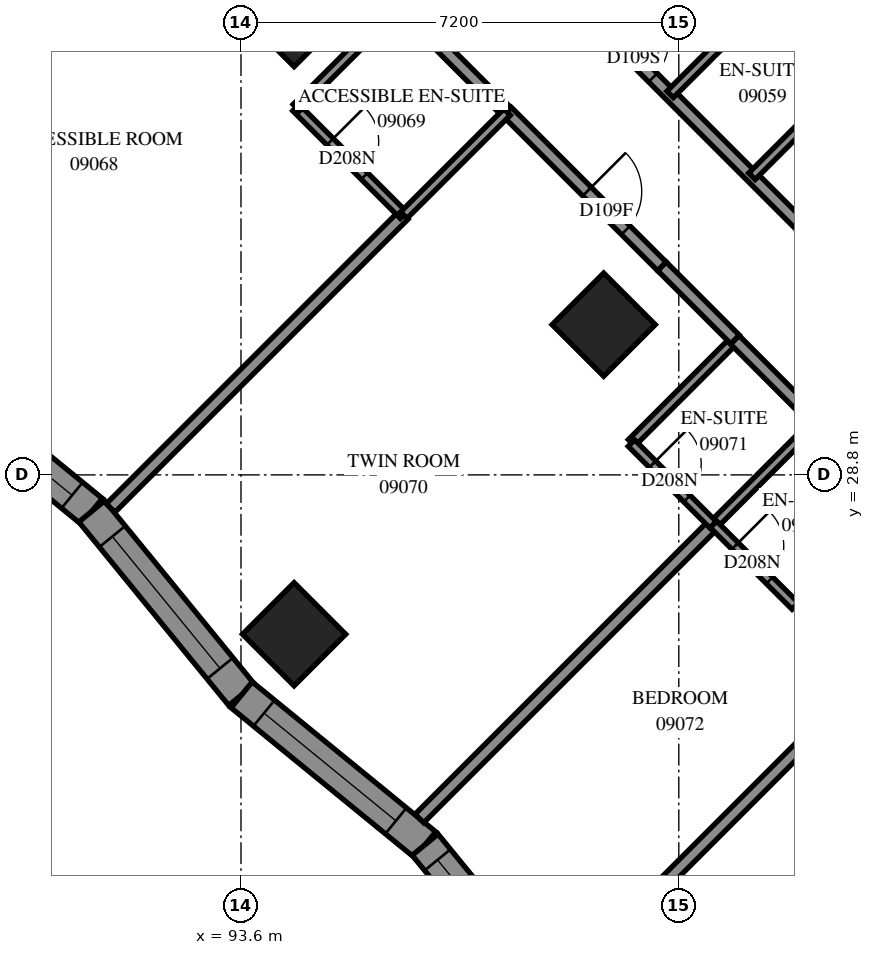
"""IFC4 building model, lengths in metres.
Left out: names, types, materials, properties, quantities, classifications, styles, units other than length and angle.
Written with IfcOpenShell. Run it as: python <this file> out.ifc"""

import sys

from ifc_helpers import new_model, si_unit, direction, frame, frame_2d, origin, origin_2d, place, context, subcontext, project, spatial, polyline, rectangle, outline, extrude, element, fill, save


model = new_model("IFC4")
c1 = context("Model", 3, precision=1e-05, world=origin(), true_north=direction((0.0, 1.0)))
c2 = subcontext(c1, "Body", "Model", "MODEL_VIEW")
j1 = project(units=[si_unit("LENGTHUNIT", "METRE"), si_unit("PLANEANGLEUNIT", "RADIAN")], contexts=[c1])
p1 = place(None, origin())
s1 = spatial("IfcSite", under=j1, at=p1, CompositionType="ELEMENT")
p2 = place(p1, origin())
s2 = spatial("IfcBuilding", under=s1, at=p2, CompositionType="ELEMENT")
p3 = place(p2, frame((0.0, 0.0, 37.2)))
s3 = spatial("IfcBuildingStorey", under=s2, at=p3, CompositionType="ELEMENT", Elevation=37.2)
for number, where, z_axis, x_axis in (
    (1, (94.474, 36.362, 0.0), (0.0, 0.0, 1.0), (0.707, -0.707, 0.0)),
    (2, (99.565, 31.271, 0.0), (0.0, 0.0, 1.0), (0.707, -0.707, 0.0)),
    (3, (94.474, 26.18, 0.0), (0.0, 0.0, 1.0), (0.707, -0.707, 0.0)),
):
    element("IfcColumn", number, at=place(p3, frame(where, z_axis=z_axis, x_axis=x_axis)), inside=s3, PredefinedType="COLUMN", context=c2, shape_type="SweptSolid", body=[
        extrude(rectangle(XDim=1.2, YDim=1.2, at=origin_2d()), origin(), (0.0, 0.0, 1.0), 3.1),
    ])
p4 = place(p3, frame((88.129, 30.665, 0.0), z_axis=(0.0, 0.0, 1.0), x_axis=(0.774508234, -0.6325638271, 0.0)))
e4 = element("IfcWall", 4, at=p4, inside=s3, PredefinedType="SOLIDWALL", context=c2, shape_type="SweptSolid", body=[
    extrude(outline(polyline([(-0.028, -0.275), (3.868, -0.275), (3.924, 0.275), (0.028, 0.275), (-0.028, -0.275)])), origin(), (0.0, 0.0, 1.0), 3.1),
])
p5 = place(p4, frame((0.678, 0.0, 0.5)))
e5 = element("IfcOpeningElement", 5, at=p5, cuts=e4, PredefinedType="OPENING", context=c2, shape_type="SweptSolid", body=[
    extrude(rectangle(XDim=2.8, YDim=2.45, at=frame_2d((1.4, 1.225))), frame((0.0, 0.285, 0.0), z_axis=(0.0, -1.0, 0.0), x_axis=(1.0, 0.0, 0.0)), (0.0, 0.0, 1.0), 0.57),
])
p6 = place(p3, frame((91.146, 28.2, 0.0), z_axis=(0.0, 0.0, 1.0), x_axis=(0.6325666489, -0.7745059294, 0.0)))
e6 = element("IfcWall", 6, at=p6, inside=s3, PredefinedType="SOLIDWALL", context=c2, shape_type="SweptSolid", body=[
    extrude(outline(polyline([(0.028, -0.275), (3.924, -0.275), (3.868, 0.275), (-0.028, 0.275), (0.028, -0.275)])), origin(), (0.0, 0.0, 1.0), 3.1),
])
p7 = place(p6, frame((0.534, 0.0, 0.5)))
e7 = element("IfcOpeningElement", 7, at=p7, cuts=e6, PredefinedType="OPENING", context=c2, shape_type="SweptSolid", body=[
    extrude(rectangle(XDim=2.8, YDim=2.45, at=frame_2d((1.4, 1.225))), frame((0.0, 0.285, 0.0), z_axis=(0.0, -1.0, 0.0), x_axis=(1.0, 0.0, 0.0)), (0.0, 0.0, 1.0), 0.57),
])
p8 = place(p3, frame((93.611, 25.183, 0.0), z_axis=(0.0, 0.0, 1.0), x_axis=(0.7744956586, -0.6325792241, 0.0)))
e8 = element("IfcWall", 8, at=p8, inside=s3, PredefinedType="SOLIDWALL", context=c2, shape_type="SweptSolid", body=[
    extrude(outline(polyline([(-0.028, -0.275), (3.868, -0.275), (3.924, 0.275), (0.028, 0.275), (-0.028, -0.275)])), origin(), (0.0, 0.0, 1.0), 3.1),
])
p9 = place(p8, frame((0.475, 0.0, 0.5)))
e9 = element("IfcOpeningElement", 9, at=p9, cuts=e8, PredefinedType="OPENING", context=c2, shape_type="SweptSolid", body=[
    extrude(rectangle(XDim=2.8, YDim=2.45, at=frame_2d((1.4, 1.225))), frame((0.0, 0.285, 0.0), z_axis=(0.0, -1.0, 0.0), x_axis=(1.0, 0.0, 0.0)), (0.0, 0.0, 1.0), 0.57),
])
p10 = place(p3, frame((96.628, 22.718, 0.0), z_axis=(0.0, 0.0, 1.0), x_axis=(0.6325792241, -0.7744956586, 0.0)))
e10 = element("IfcWall", 10, at=p10, inside=s3, PredefinedType="SOLIDWALL", context=c2, shape_type="SweptSolid", body=[
    extrude(outline(polyline([(0.028, -0.275), (3.924, -0.275), (3.868, 0.275), (-0.028, 0.275), (0.028, -0.275)])), origin(), (0.0, 0.0, 1.0), 3.1),
])
p11 = place(p10, frame((0.323, 0.0, 0.5)))
e11 = element("IfcOpeningElement", 11, at=p11, cuts=e10, PredefinedType="OPENING", context=c2, shape_type="SweptSolid", body=[
    extrude(rectangle(XDim=2.8, YDim=2.45, at=frame_2d((1.4, 1.225))), frame((0.0, 0.285, 0.0), z_axis=(0.0, -1.0, 0.0), x_axis=(1.0, 0.0, 0.0)), (0.0, 0.0, 1.0), 0.57),
])
p12 = place(p3, frame((86.33, 33.302, 0.0), z_axis=(0.0, 0.0, 1.0), x_axis=(0.7069989149, 0.707214631, 0.0)))
e12 = element("IfcWall", 12, at=p12, inside=s3, PredefinedType="PARTITIONING", context=c2, shape_type="SweptSolid", body=[
    extrude(rectangle(XDim=9.271, YDim=0.2, at=frame_2d((4.636, 0.0))), origin(), (0.0, 0.0, 1.0), 3.1),
])
p13 = place(p3, frame((92.243, 40.495, 0.0), z_axis=(0.0, 0.0, 1.0), x_axis=(0.7071067812, -0.7071067812, 0.0)))
e13 = element("IfcWall", 13, at=p13, inside=s3, PredefinedType="PARTITIONING", context=c2, shape_type="SweptSolid", body=[
    extrude(rectangle(XDim=8.101, YDim=0.2, at=frame_2d((4.05, 0.0))), origin(), (0.0, 0.0, 1.0), 3.1),
])
p14 = place(p13, frame((2.75, 0.0, 0.0)))
e14 = element("IfcOpeningElement", 14, at=p14, cuts=e13, PredefinedType="OPENING", context=c2, shape_type="SweptSolid", body=[
    extrude(rectangle(XDim=0.9, YDim=2.1, at=frame_2d((0.45, 1.05))), frame((0.0, 0.11, 0.0), z_axis=(0.0, -1.0, 0.0), x_axis=(1.0, 0.0, 0.0)), (0.0, 0.0, 1.0), 0.22),
])
p15 = place(p3, frame((86.836, 35.372, 0.0), z_axis=(0.0, 0.0, 1.0), x_axis=(0.7071067812, 0.7071067812, 0.0)))
e15 = element("IfcWall", 15, at=p15, inside=s3, PredefinedType="PARTITIONING", context=c2, shape_type="SweptSolid", body=[
    extrude(rectangle(XDim=7.45, YDim=0.2, at=frame_2d((3.725, 0.0))), origin(), (0.0, 0.0, 1.0), 3.1),
])
p16 = place(p15, frame((6.192, 0.0, 0.0)))
e16 = element("IfcOpeningElement", 16, at=p16, cuts=e15, PredefinedType="OPENING", context=c2, shape_type="SweptSolid", body=[
    extrude(rectangle(XDim=1.0, YDim=2.1, at=frame_2d((0.5, 1.05))), frame((0.0, 0.11, 0.0), z_axis=(0.0, -1.0, 0.0), x_axis=(1.0, 0.0, 0.0)), (0.0, 0.0, 1.0), 0.22),
])
p17 = place(p3, frame((99.455, 36.253, 0.0), z_axis=(0.0, 0.0, 1.0), x_axis=(0.7071067812, -0.7071067812, 0.0)))
e17 = element("IfcWall", 17, at=p17, inside=s3, PredefinedType="PARTITIONING", context=c2, shape_type="SweptSolid", body=[
    extrude(rectangle(XDim=7.201, YDim=0.2, at=frame_2d((3.601, 0.0))), origin(), (0.0, 0.0, 1.0), 3.1),
])
p18 = place(p17, frame((0.401, 0.0, 0.0)))
e18 = element("IfcOpeningElement", 18, at=p18, cuts=e17, PredefinedType="OPENING", context=c2, shape_type="SweptSolid", body=[
    extrude(rectangle(XDim=0.9, YDim=2.1, at=frame_2d((0.45, 1.05))), frame((0.0, 0.11, 0.0), z_axis=(0.0, -1.0, 0.0), x_axis=(1.0, 0.0, 0.0)), (0.0, 0.0, 1.0), 0.22),
])
p19 = place(p3, frame((96.534, 23.151, 0.0), z_axis=(0.0, 0.0, 1.0), x_axis=(0.7071067812, 0.7071067812, 0.0)))
e19 = element("IfcWall", 19, at=p19, inside=s3, PredefinedType="PARTITIONING", context=c2, shape_type="SweptSolid", body=[
    extrude(rectangle(XDim=6.835, YDim=0.2, at=frame_2d((3.417, 0.0))), origin(), (0.0, 0.0, 1.0), 3.1),
])
p20 = place(p3, frame((91.457, 28.255, 0.0), z_axis=(0.0, 0.0, 1.0), x_axis=(0.7071067812, 0.7071067812, 0.0)))
e20 = element("IfcWall", 20, at=p20, inside=s3, PredefinedType="PARTITIONING", context=c2, shape_type="SweptSolid", body=[
    extrude(rectangle(XDim=6.815, YDim=0.2, at=frame_2d((3.408, 0.0))), origin(), (0.0, 0.0, 1.0), 3.1),
])
p21 = place(p3, frame((100.163, 21.689, 0.0), z_axis=(0.0, 0.0, 1.0), x_axis=(0.7071067812, 0.7071067812, 0.0)))
e21 = element("IfcWall", 21, at=p21, inside=s3, PredefinedType="PARTITIONING", context=c2, shape_type="SweptSolid", body=[
    extrude(rectangle(XDim=5.504, YDim=0.2, at=frame_2d((2.752, 0.0))), origin(), (0.0, 0.0, 1.0), 3.1),
])
p22 = place(p3, frame((97.976, 34.772, 0.0), z_axis=(0.0, 0.0, 1.0), x_axis=(0.7073845681, -0.7068288851, 0.0)))
e22 = element("IfcWall", 22, at=p22, inside=s3, PredefinedType="PARTITIONING", context=c2, shape_type="SweptSolid", body=[
    extrude(rectangle(XDim=3.599, YDim=0.2, at=frame_2d((1.8, 0.0))), origin(), (0.0, 0.0, 1.0), 3.1),
])
p23 = place(p22, frame((1.858, 0.0, 0.0)))
e23 = element("IfcOpeningElement", 23, at=p23, cuts=e22, PredefinedType="OPENING", context=c2, shape_type="SweptSolid", body=[
    extrude(rectangle(XDim=0.9, YDim=2.1, at=frame_2d((0.45, 1.05))), frame((0.0, 0.11, 0.0), z_axis=(0.0, -1.0, 0.0), x_axis=(1.0, 0.0, 0.0)), (0.0, 0.0, 1.0), 0.22),
])
p24 = place(p3, frame((94.505, 34.839, 0.0), z_axis=(0.0, 0.0, 1.0), x_axis=(0.7071067812, -0.7071067812, 0.0)))
e24 = element("IfcWall", 24, at=p24, inside=s3, PredefinedType="PARTITIONING", context=c2, shape_type="SweptSolid", body=[
    extrude(rectangle(XDim=2.5, YDim=0.15, at=frame_2d((1.25, 0.0))), origin(), (0.0, 0.0, 1.0), 3.1),
])
p25 = place(p24, frame((0.792, 0.0, 0.0)))
e25 = element("IfcOpeningElement", 25, at=p25, cuts=e24, PredefinedType="OPENING", context=c2, shape_type="SweptSolid", body=[
    extrude(rectangle(XDim=0.8, YDim=2.1, at=frame_2d((0.4, 1.05))), frame((0.0, 0.085, 0.0), z_axis=(0.0, -1.0, 0.0), x_axis=(1.0, 0.0, 0.0)), (0.0, 0.0, 1.0), 0.17),
])
for number, where, z_axis, x_axis in (
    (26, (102.003, 33.711, 0.0), (0.0, 0.0, 1.0), (0.707, 0.707, 0.0)),
    (27, (100.023, 29.327, 0.0), (0.0, 0.0, 1.0), (0.707, 0.707, 0.0)),
):
    element("IfcWall", number, at=place(p3, frame(where, z_axis=z_axis, x_axis=x_axis)), inside=s3, PredefinedType="PARTITIONING", context=c2, shape_type="SweptSolid", body=[
        extrude(rectangle(XDim=2.401, YDim=0.15, at=frame_2d((1.201, 0.0))), origin(), (0.0, 0.0, 1.0), 3.1),
    ])
for number, where, z_axis, x_axis in (
    (28, (96.278, 33.072, 0.0), (0.0, 0.0, 1.0), (0.708, 0.707, 0.0)),
    (29, (94.511, 34.839, 0.0), (0.0, 0.0, 1.0), (0.708, 0.707, 0.0)),
    (30, (100.657, 35.057, 0.0), (0.0, 0.0, 1.0), (0.708, 0.707, 0.0)),
    (31, (101.371, 27.979, 0.0), (0.0, 0.0, 1.0), (0.707, 0.708, 0.0)),
):
    element("IfcWall", number, at=place(p3, frame(where, z_axis=z_axis, x_axis=x_axis)), inside=s3, PredefinedType="PARTITIONING", context=c2, shape_type="SweptSolid", body=[
        extrude(rectangle(XDim=2.4, YDim=0.15, at=frame_2d((1.2, 0.0))), origin(), (0.0, 0.0, 1.0), 3.1),
    ])
p26 = place(p3, frame((102.711, 26.641, 0.0), z_axis=(0.0, 0.0, 1.0), x_axis=(0.7071067812, 0.7071067812, 0.0)))
e32 = element("IfcWall", 32, at=p26, inside=s3, PredefinedType="PARTITIONING", context=c2, shape_type="SweptSolid", body=[
    extrude(rectangle(XDim=2.398, YDim=0.15, at=frame_2d((1.199, 0.0))), origin(), (0.0, 0.0, 1.0), 3.1),
])
p27 = place(p3, frame((100.021, 29.323, 0.0), z_axis=(0.0, 0.0, 1.0), x_axis=(0.7071067812, -0.7071067812, 0.0)))
e33 = element("IfcWall", 33, at=p27, inside=s3, PredefinedType="PARTITIONING", context=c2, shape_type="SweptSolid", body=[
    extrude(rectangle(XDim=1.901, YDim=0.15, at=frame_2d((0.95, 0.0))), origin(), (0.0, 0.0, 1.0), 3.1),
])
p28 = place(p27, frame((0.491, 0.0, 0.0)))
e34 = element("IfcOpeningElement", 34, at=p28, cuts=e33, PredefinedType="OPENING", context=c2, shape_type="SweptSolid", body=[
    extrude(rectangle(XDim=0.8, YDim=2.1, at=frame_2d((0.4, 1.05))), frame((0.0, 0.085, 0.0), z_axis=(0.0, -1.0, 0.0), x_axis=(1.0, 0.0, 0.0)), (0.0, 0.0, 1.0), 0.17),
])
p29 = place(p3, frame((101.371, 27.985, 0.0), z_axis=(0.0, 0.0, 1.0), x_axis=(0.7076330979, -0.7065800724, 0.0)))
e35 = element("IfcWall", 35, at=p29, inside=s3, PredefinedType="PARTITIONING", context=c2, shape_type="SweptSolid", body=[
    extrude(rectangle(XDim=1.899, YDim=0.15, at=frame_2d((0.95, 0.0))), origin(), (0.0, 0.0, 1.0), 3.1),
])
p30 = place(p29, frame((0.501, 0.0, 0.0)))
e36 = element("IfcOpeningElement", 36, at=p30, cuts=e35, PredefinedType="OPENING", context=c2, shape_type="SweptSolid", body=[
    extrude(rectangle(XDim=0.8, YDim=2.1, at=frame_2d((0.4, 1.05))), frame((0.0, 0.085, 0.0), z_axis=(0.0, -1.0, 0.0), x_axis=(1.0, 0.0, 0.0)), (0.0, 0.0, 1.0), 0.17),
])
p31 = place(p3, frame((101.72, 31.022, 0.0), z_axis=(0.0, 0.0, 1.0), x_axis=(0.7065800724, -0.7076330979, 0.0)))
e37 = element("IfcWall", 37, at=p31, inside=s3, PredefinedType="PARTITIONING", context=c2, shape_type="SweptSolid", body=[
    extrude(rectangle(XDim=1.899, YDim=0.2, at=frame_2d((0.95, 0.0))), origin(), (0.0, 0.0, 1.0), 3.1),
])
p32 = place(p3, frame((102.358, 36.75, 0.0), z_axis=(0.0, 0.0, 1.0), x_axis=(0.7076330979, -0.7065800724, 0.0)))
e38 = element("IfcWall", 38, at=p32, inside=s3, PredefinedType="PARTITIONING", context=c2, shape_type="SweptSolid", body=[
    extrude(rectangle(XDim=1.899, YDim=0.15, at=frame_2d((0.95, 0.0))), origin(), (0.0, 0.0, 1.0), 3.1),
])
p33 = place(p32, frame((0.296, 0.0, 0.0)))
e39 = element("IfcOpeningElement", 39, at=p33, cuts=e38, PredefinedType="OPENING", context=c2, shape_type="SweptSolid", body=[
    extrude(rectangle(XDim=0.8, YDim=2.1, at=frame_2d((0.4, 1.05))), frame((0.0, 0.085, 0.0), z_axis=(0.0, -1.0, 0.0), x_axis=(1.0, 0.0, 0.0)), (0.0, 0.0, 1.0), 0.17),
])
p34 = place(p3, frame((100.523, 32.229, 0.0), z_axis=(0.0, 0.0, 1.0), x_axis=(0.7071067812, -0.7071067812, 0.0)))
e40 = element("IfcWall", 40, at=p34, inside=s3, PredefinedType="PARTITIONING", context=c2, shape_type="SweptSolid", body=[
    extrude(rectangle(XDim=1.7, YDim=0.2, at=frame_2d((0.85, 0.0))), origin(), (0.0, 0.0, 1.0), 3.1),
])
p35 = place(p5, origin())
e41 = element("IfcWindow", 41, at=p35, inside=s3, PartitioningType="SINGLE_PANEL", PredefinedType="WINDOW", context=c2, shape_type="SweptSolid", body=[
    extrude(rectangle(XDim=2.8, YDim=2.45, at=frame_2d((1.4, 1.225))), frame((0.0, 0.155, 0.0), z_axis=(0.0, -1.0, 0.0), x_axis=(1.0, 0.0, 0.0)), (0.0, 0.0, 1.0), 0.06),
])
fill(e5, e41)
p36 = place(p7, origin())
e42 = element("IfcWindow", 42, at=p36, inside=s3, PartitioningType="SINGLE_PANEL", PredefinedType="WINDOW", context=c2, shape_type="SweptSolid", body=[
    extrude(rectangle(XDim=2.8, YDim=2.45, at=frame_2d((1.4, 1.225))), frame((0.0, 0.155, 0.0), z_axis=(0.0, -1.0, 0.0), x_axis=(1.0, 0.0, 0.0)), (0.0, 0.0, 1.0), 0.06),
])
fill(e7, e42)
p37 = place(p9, origin())
e43 = element("IfcWindow", 43, at=p37, inside=s3, PartitioningType="SINGLE_PANEL", PredefinedType="WINDOW", context=c2, shape_type="SweptSolid", body=[
    extrude(rectangle(XDim=2.8, YDim=2.45, at=frame_2d((1.4, 1.225))), frame((0.0, 0.155, 0.0), z_axis=(0.0, -1.0, 0.0), x_axis=(1.0, 0.0, 0.0)), (0.0, 0.0, 1.0), 0.06),
])
fill(e9, e43)
p38 = place(p11, origin())
e44 = element("IfcWindow", 44, at=p38, inside=s3, PartitioningType="SINGLE_PANEL", PredefinedType="WINDOW", context=c2, shape_type="SweptSolid", body=[
    extrude(rectangle(XDim=2.8, YDim=2.45, at=frame_2d((1.4, 1.225))), frame((0.0, 0.155, 0.0), z_axis=(0.0, -1.0, 0.0), x_axis=(1.0, 0.0, 0.0)), (0.0, 0.0, 1.0), 0.06),
])
fill(e11, e44)
p39 = place(p18, origin())
e45 = element("IfcDoor", 45, at=p39, inside=s3, OperationType="SINGLE_SWING_RIGHT", PredefinedType="DOOR", context=c2, shape_type="SweptSolid", body=[
    extrude(rectangle(XDim=0.9, YDim=2.1, at=frame_2d((0.45, 1.05))), frame((0.0, 0.025, 0.0), z_axis=(0.0, -1.0, 0.0), x_axis=(1.0, 0.0, 0.0)), (0.0, 0.0, 1.0), 0.05),
])
fill(e18, e45)
p40 = place(p25, origin())
e46 = element("IfcDoor", 46, at=p40, inside=s3, OperationType="SINGLE_SWING_RIGHT", PredefinedType="DOOR", context=c2, shape_type="SweptSolid", body=[
    extrude(rectangle(XDim=0.8, YDim=2.1, at=frame_2d((0.4, 1.05))), frame((0.0, 0.025, 0.0), z_axis=(0.0, -1.0, 0.0), x_axis=(1.0, 0.0, 0.0)), (0.0, 0.0, 1.0), 0.05),
])
fill(e25, e46)
p41 = place(p23, origin())
e47 = element("IfcDoor", 47, at=p41, inside=s3, OperationType="SINGLE_SWING_LEFT", PredefinedType="DOOR", context=c2, shape_type="SweptSolid", body=[
    extrude(rectangle(XDim=0.9, YDim=2.1, at=frame_2d((0.45, 1.05))), frame((0.0, 0.025, 0.0), z_axis=(0.0, -1.0, 0.0), x_axis=(1.0, 0.0, 0.0)), (0.0, 0.0, 1.0), 0.05),
])
fill(e23, e47)
p42 = place(p28, origin())
e48 = element("IfcDoor", 48, at=p42, inside=s3, OperationType="SINGLE_SWING_RIGHT", PredefinedType="DOOR", context=c2, shape_type="SweptSolid", body=[
    extrude(rectangle(XDim=0.8, YDim=2.1, at=frame_2d((0.4, 1.05))), frame((0.0, 0.025, 0.0), z_axis=(0.0, -1.0, 0.0), x_axis=(1.0, 0.0, 0.0)), (0.0, 0.0, 1.0), 0.05),
])
fill(e34, e48)
p43 = place(p30, origin())
e49 = element("IfcDoor", 49, at=p43, inside=s3, OperationType="SINGLE_SWING_RIGHT", PredefinedType="DOOR", context=c2, shape_type="SweptSolid", body=[
    extrude(rectangle(XDim=0.8, YDim=2.1, at=frame_2d((0.4, 1.05))), frame((0.0, 0.025, 0.0), z_axis=(0.0, -1.0, 0.0), x_axis=(1.0, 0.0, 0.0)), (0.0, 0.0, 1.0), 0.05),
])
fill(e36, e49)
save(model, sys.argv[1])
